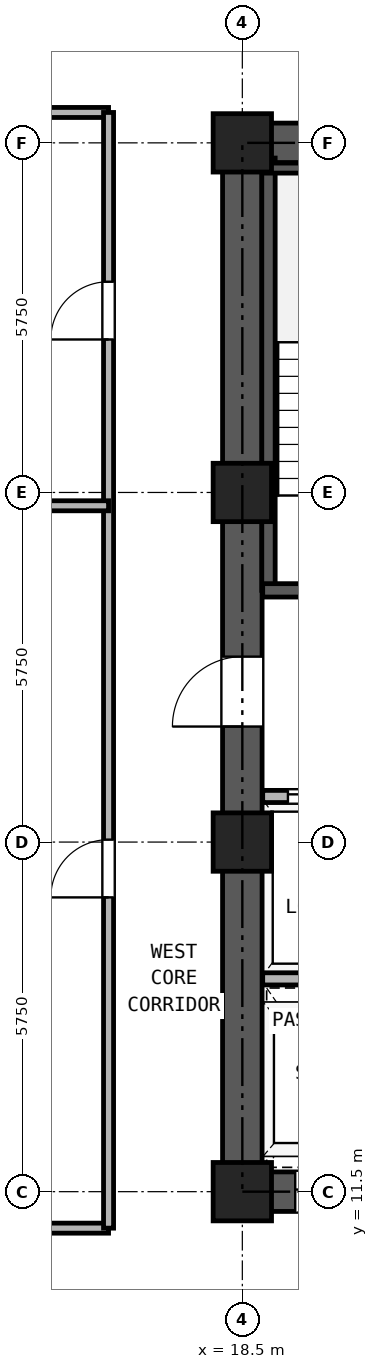
"""IFC4 building model, lengths in metres.
Left out: names, types, materials, properties, quantities, classifications, styles, units other than length and angle.
Written with IfcOpenShell. Run it as: python <this file> out.ifc"""

import sys

from ifc_helpers import new_model, si_unit, direction, frame, frame_2d, origin, origin_2d, place, context, subcontext, project, spatial, rectangle, hollow_rectangle, extrude, source, transform, mapped, element, fill, save


model = new_model("IFC4")
c1 = context("Model", 3, precision=1e-05, world=origin(), true_north=direction((0.0, 1.0)))
c2 = subcontext(c1, "Body", "Model", "MODEL_VIEW")
j1 = project(units=[si_unit("LENGTHUNIT", "METRE"), si_unit("PLANEANGLEUNIT", "RADIAN")], contexts=[c1])
p1 = place(None, origin())
s1 = spatial("IfcSite", under=j1, at=p1, CompositionType="ELEMENT")
p2 = place(p1, origin())
s2 = spatial("IfcBuilding", under=s1, at=p2, CompositionType="ELEMENT")
p3 = place(p2, frame((0.0, 0.0, 26.1)))
s3 = spatial("IfcBuildingStorey", under=s2, at=p3, CompositionType="ELEMENT", Elevation=26.1)
m1 = source(origin(), c2, "Body", "SweptSolid", [
    extrude(hollow_rectangle(XDim=0.96, YDim=0.96, WallThickness=0.06, at=origin_2d()), origin(), (0.0, 0.0, 1.0), 3.32),
])
for number, where, z_axis, x_axis in (
    (1, (18.5, 11.5, 0.0), (0.0, 0.0, 1.0), (1.0, 0.0, 0.0)),
    (2, (18.5, 17.25, 0.0), (0.0, 0.0, 1.0), (1.0, 0.0, 0.0)),
    (3, (18.5, 23.0, 0.0), (0.0, 0.0, 1.0), (1.0, 0.0, 0.0)),
    (4, (18.5, 28.75, 0.0), (0.0, 0.0, 1.0), (1.0, 0.0, 0.0)),
):
    element("IfcColumn", number, at=place(p3, frame(where, z_axis=z_axis, x_axis=x_axis)), inside=s3, PredefinedType="COLUMN", context=c2, shape_type="MappedRepresentation", body=[
        mapped(m1, transform((0.0, 0.0, 0.0), x_axis=(1.0, 0.0, 0.0), y_axis=(0.0, 1.0, 0.0), z_axis=(0.0, 0.0, 1.0), scale=1.0)),
    ])
p4 = place(p3, frame((18.175, 11.5, 0.0), z_axis=(0.0, 0.0, 1.0), x_axis=(1.0, 0.0, 0.0)))
e5 = element("IfcWall", 5, at=p4, inside=s3, PredefinedType="SHEAR", context=c2, shape_type="SweptSolid", body=[
    extrude(rectangle(XDim=10.65, YDim=0.65, at=frame_2d((5.325, 0.0))), origin(), (0.0, 0.0, 1.0), 3.32),
])
p5 = place(p4, frame((1.195, 0.0, 0.0)))
e6 = element("IfcOpeningElement", 6, at=p5, cuts=e5, PredefinedType="OPENING", context=c2, shape_type="SweptSolid", body=[
    extrude(rectangle(XDim=1.1, YDim=2.25, at=frame_2d((0.55, 1.125))), frame((0.0, 0.335, 0.0), z_axis=(0.0, -1.0, 0.0), x_axis=(1.0, 0.0, 0.0)), (0.0, 0.0, 1.0), 0.67),
])
p6 = place(p4, frame((3.495, 0.0, 0.0)))
e7 = element("IfcOpeningElement", 7, at=p6, cuts=e5, PredefinedType="OPENING", context=c2, shape_type="SweptSolid", body=[
    extrude(rectangle(XDim=1.1, YDim=2.25, at=frame_2d((0.55, 1.125))), frame((0.0, 0.335, 0.0), z_axis=(0.0, -1.0, 0.0), x_axis=(1.0, 0.0, 0.0)), (0.0, 0.0, 1.0), 0.67),
])
p7 = place(p4, frame((5.925, 0.0, 0.0)))
e8 = element("IfcOpeningElement", 8, at=p7, cuts=e5, PredefinedType="OPENING", context=c2, shape_type="SweptSolid", body=[
    extrude(rectangle(XDim=1.1, YDim=2.25, at=frame_2d((0.55, 1.125))), frame((0.0, 0.335, 0.0), z_axis=(0.0, -1.0, 0.0), x_axis=(1.0, 0.0, 0.0)), (0.0, 0.0, 1.0), 0.67),
])
p8 = place(p4, frame((8.325, 0.0, 0.0)))
e9 = element("IfcOpeningElement", 9, at=p8, cuts=e5, PredefinedType="OPENING", context=c2, shape_type="SweptSolid", body=[
    extrude(rectangle(XDim=1.1, YDim=2.25, at=frame_2d((0.55, 1.125))), frame((0.0, 0.335, 0.0), z_axis=(0.0, -1.0, 0.0), x_axis=(1.0, 0.0, 0.0)), (0.0, 0.0, 1.0), 0.67),
])
p9 = place(p3, frame((18.175, 28.75, 0.0), z_axis=(0.0, 0.0, 1.0), x_axis=(1.0, 0.0, 0.0)))
e10 = element("IfcWall", 10, at=p9, inside=s3, PredefinedType="SHEAR", context=c2, shape_type="SweptSolid", body=[
    extrude(rectangle(XDim=10.65, YDim=0.65, at=frame_2d((5.325, 0.0))), origin(), (0.0, 0.0, 1.0), 3.32),
])
p10 = place(p9, frame((4.205, 0.0, 0.0)))
e11 = element("IfcOpeningElement", 11, at=p10, cuts=e10, PredefinedType="OPENING", context=c2, shape_type="SweptSolid", body=[
    extrude(rectangle(XDim=0.9, YDim=2.05, at=frame_2d((0.45, 1.025))), frame((0.0, 0.335, 0.0), z_axis=(0.0, -1.0, 0.0), x_axis=(1.0, 0.0, 0.0)), (0.0, 0.0, 1.0), 0.67),
])
p11 = place(p9, frame((5.745, 0.0, 0.0)))
e12 = element("IfcOpeningElement", 12, at=p11, cuts=e10, PredefinedType="OPENING", context=c2, shape_type="SweptSolid", body=[
    extrude(rectangle(XDim=0.9, YDim=2.05, at=frame_2d((0.45, 1.025))), frame((0.0, 0.335, 0.0), z_axis=(0.0, -1.0, 0.0), x_axis=(1.0, 0.0, 0.0)), (0.0, 0.0, 1.0), 0.67),
])
p12 = place(p3, frame((18.5, 11.825, 0.0), z_axis=(0.0, 0.0, 1.0), x_axis=(0.0, 1.0, 0.0)))
e13 = element("IfcWall", 13, at=p12, inside=s3, PredefinedType="SHEAR", context=c2, shape_type="SweptSolid", body=[
    extrude(rectangle(XDim=16.6, YDim=0.65, at=frame_2d((8.3, 0.0))), origin(), (0.0, 0.0, 1.0), 3.32),
])
p13 = place(p12, frame((7.325, 0.0, 0.0)))
e14 = element("IfcOpeningElement", 14, at=p13, cuts=e13, PredefinedType="OPENING", context=c2, shape_type="SweptSolid", body=[
    extrude(rectangle(XDim=1.15, YDim=2.2, at=frame_2d((0.575, 1.1))), frame((0.0, 0.335, 0.0), z_axis=(0.0, -1.0, 0.0), x_axis=(1.0, 0.0, 0.0)), (0.0, 0.0, 1.0), 0.67),
])
p14 = place(p3, frame((18.93, 21.39, 0.0), z_axis=(0.0, 0.0, 1.0), x_axis=(0.0, 1.0, 0.0)))
e15 = element("IfcWall", 15, at=p14, inside=s3, PredefinedType="SOLIDWALL", context=c2, shape_type="SweptSolid", body=[
    extrude(rectangle(XDim=7.11, YDim=0.22, at=frame_2d((3.555, 0.0))), origin(), (0.0, 0.0, 1.0), 3.32),
])
p15 = place(p3, frame((18.835, 28.335, 0.0), z_axis=(0.0, 0.0, 1.0), x_axis=(1.0, 0.0, 0.0)))
e16 = element("IfcWall", 16, at=p15, inside=s3, PredefinedType="PARTITIONING", context=c2, shape_type="SweptSolid", body=[
    extrude(rectangle(XDim=3.275, YDim=0.165, at=frame_2d((1.638, 0.0))), origin(), (0.0, 0.0, 1.0), 3.32),
])
p16 = place(p3, frame((18.835, 21.39, 0.0), z_axis=(0.0, 0.0, 1.0), x_axis=(1.0, 0.0, 0.0)))
e17 = element("IfcWall", 17, at=p16, inside=s3, PredefinedType="SOLIDWALL", context=c2, shape_type="SweptSolid", body=[
    extrude(rectangle(XDim=6.295, YDim=0.22, at=frame_2d((3.147, 0.0))), origin(), (0.0, 0.0, 1.0), 3.32),
])
p17 = place(p16, frame((1.015, 0.0, 0.0)))
e18 = element("IfcOpeningElement", 18, at=p17, cuts=e17, PredefinedType="OPENING", context=c2, shape_type="SweptSolid", body=[
    extrude(rectangle(XDim=1.15, YDim=2.2, at=frame_2d((0.575, 1.1))), frame((0.0, 0.12, 0.0), z_axis=(0.0, -1.0, 0.0), x_axis=(1.0, 0.0, 0.0)), (0.0, 0.0, 1.0), 0.24),
])
p18 = place(p16, frame((4.745, 0.0, 0.0)))
e19 = element("IfcOpeningElement", 19, at=p18, cuts=e17, PredefinedType="OPENING", context=c2, shape_type="SweptSolid", body=[
    extrude(rectangle(XDim=1.1, YDim=2.25, at=frame_2d((0.55, 1.125))), frame((0.0, 0.12, 0.0), z_axis=(0.0, -1.0, 0.0), x_axis=(1.0, 0.0, 0.0)), (0.0, 0.0, 1.0), 0.24),
])
p19 = place(p3, frame((18.835, 18.0, 0.0), z_axis=(0.0, 0.0, 1.0), x_axis=(1.0, 0.0, 0.0)))
e20 = element("IfcWall", 20, at=p19, inside=s3, PredefinedType="PARTITIONING", context=c2, shape_type="SweptSolid", body=[
    extrude(rectangle(XDim=9.33, YDim=0.2, at=frame_2d((4.665, 0.0))), origin(), (0.0, 0.0, 1.0), 3.32),
])
p20 = place(p19, frame((0.415, 0.0, 0.0)))
e21 = element("IfcOpeningElement", 21, at=p20, cuts=e20, PredefinedType="OPENING", context=c2, shape_type="SweptSolid", body=[
    extrude(rectangle(XDim=1.3, YDim=2.3, at=frame_2d((0.65, 1.15))), frame((0.0, 0.11, 0.0), z_axis=(0.0, -1.0, 0.0), x_axis=(1.0, 0.0, 0.0)), (0.0, 0.0, 1.0), 0.22),
])
p21 = place(p19, frame((2.515, 0.0, 0.0)))
e22 = element("IfcOpeningElement", 22, at=p21, cuts=e20, PredefinedType="OPENING", context=c2, shape_type="SweptSolid", body=[
    extrude(rectangle(XDim=1.3, YDim=2.3, at=frame_2d((0.65, 1.15))), frame((0.0, 0.11, 0.0), z_axis=(0.0, -1.0, 0.0), x_axis=(1.0, 0.0, 0.0)), (0.0, 0.0, 1.0), 0.22),
])
p22 = place(p19, frame((7.015, 0.0, 0.0)))
e23 = element("IfcOpeningElement", 23, at=p22, cuts=e20, PredefinedType="OPENING", context=c2, shape_type="SweptSolid", body=[
    extrude(rectangle(XDim=1.0, YDim=2.15, at=frame_2d((0.5, 1.075))), frame((0.0, 0.11, 0.0), z_axis=(0.0, -1.0, 0.0), x_axis=(1.0, 0.0, 0.0)), (0.0, 0.0, 1.0), 0.22),
])
p23 = place(p3, frame((18.835, 15.0, 0.0), z_axis=(0.0, 0.0, 1.0), x_axis=(1.0, 0.0, 0.0)))
e24 = element("IfcWall", 24, at=p23, inside=s3, PredefinedType="PARTITIONING", context=c2, shape_type="SweptSolid", body=[
    extrude(rectangle(XDim=9.33, YDim=0.2, at=frame_2d((4.665, 0.0))), origin(), (0.0, 0.0, 1.0), 3.32),
])
for number, where, z_axis, x_axis in (
    (25, (8.2, 10.9, 0.0), (0.0, 0.0, 1.0), (1.0, 0.0, 0.0)),
    (26, (8.2, 29.25, 0.0), (0.0, 0.0, 1.0), (1.0, 0.0, 0.0)),
):
    element("IfcWall", number, at=place(p3, frame(where, z_axis=z_axis, x_axis=x_axis)), inside=s3, PredefinedType="PARTITIONING", context=c2, shape_type="SweptSolid", body=[
        extrude(rectangle(XDim=8.1, YDim=0.165, at=frame_2d((4.05, 0.0))), origin(), (0.0, 0.0, 1.0), 3.32),
    ])
p24 = place(p3, frame((16.3, 10.9, 0.0), z_axis=(0.0, 0.0, 1.0), x_axis=(0.0, 1.0, 0.0)))
e27 = element("IfcWall", 27, at=p24, inside=s3, PredefinedType="PARTITIONING", context=c2, shape_type="SweptSolid", body=[
    extrude(rectangle(XDim=18.35, YDim=0.165, at=frame_2d((9.175, 0.0))), origin(), (0.0, 0.0, 1.0), 3.32),
])
p25 = place(p24, frame((5.44, 0.0, 0.0)))
e28 = element("IfcOpeningElement", 28, at=p25, cuts=e27, PredefinedType="OPENING", context=c2, shape_type="SweptSolid", body=[
    extrude(rectangle(XDim=0.95, YDim=2.15, at=frame_2d((0.475, 1.075))), frame((0.0, 0.093, 0.0), z_axis=(0.0, -1.0, 0.0), x_axis=(1.0, 0.0, 0.0)), (0.0, 0.0, 1.0), 0.185),
])
p26 = place(p24, frame((14.616, 0.0, 0.0)))
e29 = element("IfcOpeningElement", 29, at=p26, cuts=e27, PredefinedType="OPENING", context=c2, shape_type="SweptSolid", body=[
    extrude(rectangle(XDim=0.95, YDim=2.15, at=frame_2d((0.475, 1.075))), frame((0.0, 0.093, 0.0), z_axis=(0.0, -1.0, 0.0), x_axis=(1.0, 0.0, 0.0)), (0.0, 0.0, 1.0), 0.185),
])
p27 = place(p3, frame((8.2, 22.781, 0.0), z_axis=(0.0, 0.0, 1.0), x_axis=(1.0, 0.0, 0.0)))
e30 = element("IfcWall", 30, at=p27, inside=s3, PredefinedType="PARTITIONING", context=c2, shape_type="SweptSolid", body=[
    extrude(rectangle(XDim=8.1, YDim=0.165, at=frame_2d((4.05, 0.0))), origin(), (0.0, 0.0, 1.0), 2.539),
])
p28 = place(p20, origin())
e31 = element("IfcDoor", 31, at=p28, inside=s3, OperationType="DOUBLE_DOOR_SLIDING", PredefinedType="DOOR", context=c2, shape_type="SweptSolid", body=[
    extrude(rectangle(XDim=1.3, YDim=2.3, at=frame_2d((0.65, 1.15))), frame((0.0, 0.025, 0.0), z_axis=(0.0, -1.0, 0.0), x_axis=(1.0, 0.0, 0.0)), (0.0, 0.0, 1.0), 0.05),
])
fill(e21, e31)
p29 = place(p13, frame((1.15, 0.0, 0.0), z_axis=(0.0, 0.0, 1.0), x_axis=(-1.0, 0.0, 0.0)))
e32 = element("IfcDoor", 32, at=p29, inside=s3, OperationType="SINGLE_SWING_LEFT", PredefinedType="DOOR", context=c2, shape_type="SweptSolid", body=[
    extrude(rectangle(XDim=1.15, YDim=2.2, at=frame_2d((0.575, 1.1))), frame((0.0, 0.025, 0.0), z_axis=(0.0, -1.0, 0.0), x_axis=(1.0, 0.0, 0.0)), (0.0, 0.0, 1.0), 0.05),
])
fill(e14, e32)
p30 = place(p5, frame((1.1, 0.0, 0.0), z_axis=(0.0, 0.0, 1.0), x_axis=(-1.0, 0.0, 0.0)))
e33 = element("IfcDoor", 33, at=p30, inside=s3, OperationType="DOUBLE_DOOR_SLIDING", PredefinedType="DOOR", context=c2, shape_type="SweptSolid", body=[
    extrude(rectangle(XDim=1.1, YDim=2.25, at=frame_2d((0.55, 1.125))), frame((0.0, 0.025, 0.0), z_axis=(0.0, -1.0, 0.0), x_axis=(1.0, 0.0, 0.0)), (0.0, 0.0, 1.0), 0.05),
])
fill(e6, e33)
p31 = place(p25, frame((0.95, 0.0, 0.0), z_axis=(0.0, 0.0, 1.0), x_axis=(-1.0, 0.0, 0.0)))
e34 = element("IfcDoor", 34, at=p31, inside=s3, OperationType="SINGLE_SWING_LEFT", PredefinedType="DOOR", context=c2, shape_type="SweptSolid", body=[
    extrude(rectangle(XDim=0.95, YDim=2.15, at=frame_2d((0.475, 1.075))), frame((0.0, 0.025, 0.0), z_axis=(0.0, -1.0, 0.0), x_axis=(1.0, 0.0, 0.0)), (0.0, 0.0, 1.0), 0.05),
])
fill(e28, e34)
p32 = place(p26, frame((0.95, 0.0, 0.0), z_axis=(0.0, 0.0, 1.0), x_axis=(-1.0, 0.0, 0.0)))
e35 = element("IfcDoor", 35, at=p32, inside=s3, OperationType="SINGLE_SWING_LEFT", PredefinedType="DOOR", context=c2, shape_type="SweptSolid", body=[
    extrude(rectangle(XDim=0.95, YDim=2.15, at=frame_2d((0.475, 1.075))), frame((0.0, 0.025, 0.0), z_axis=(0.0, -1.0, 0.0), x_axis=(1.0, 0.0, 0.0)), (0.0, 0.0, 1.0), 0.05),
])
fill(e29, e35)
save(model, sys.argv[1])
